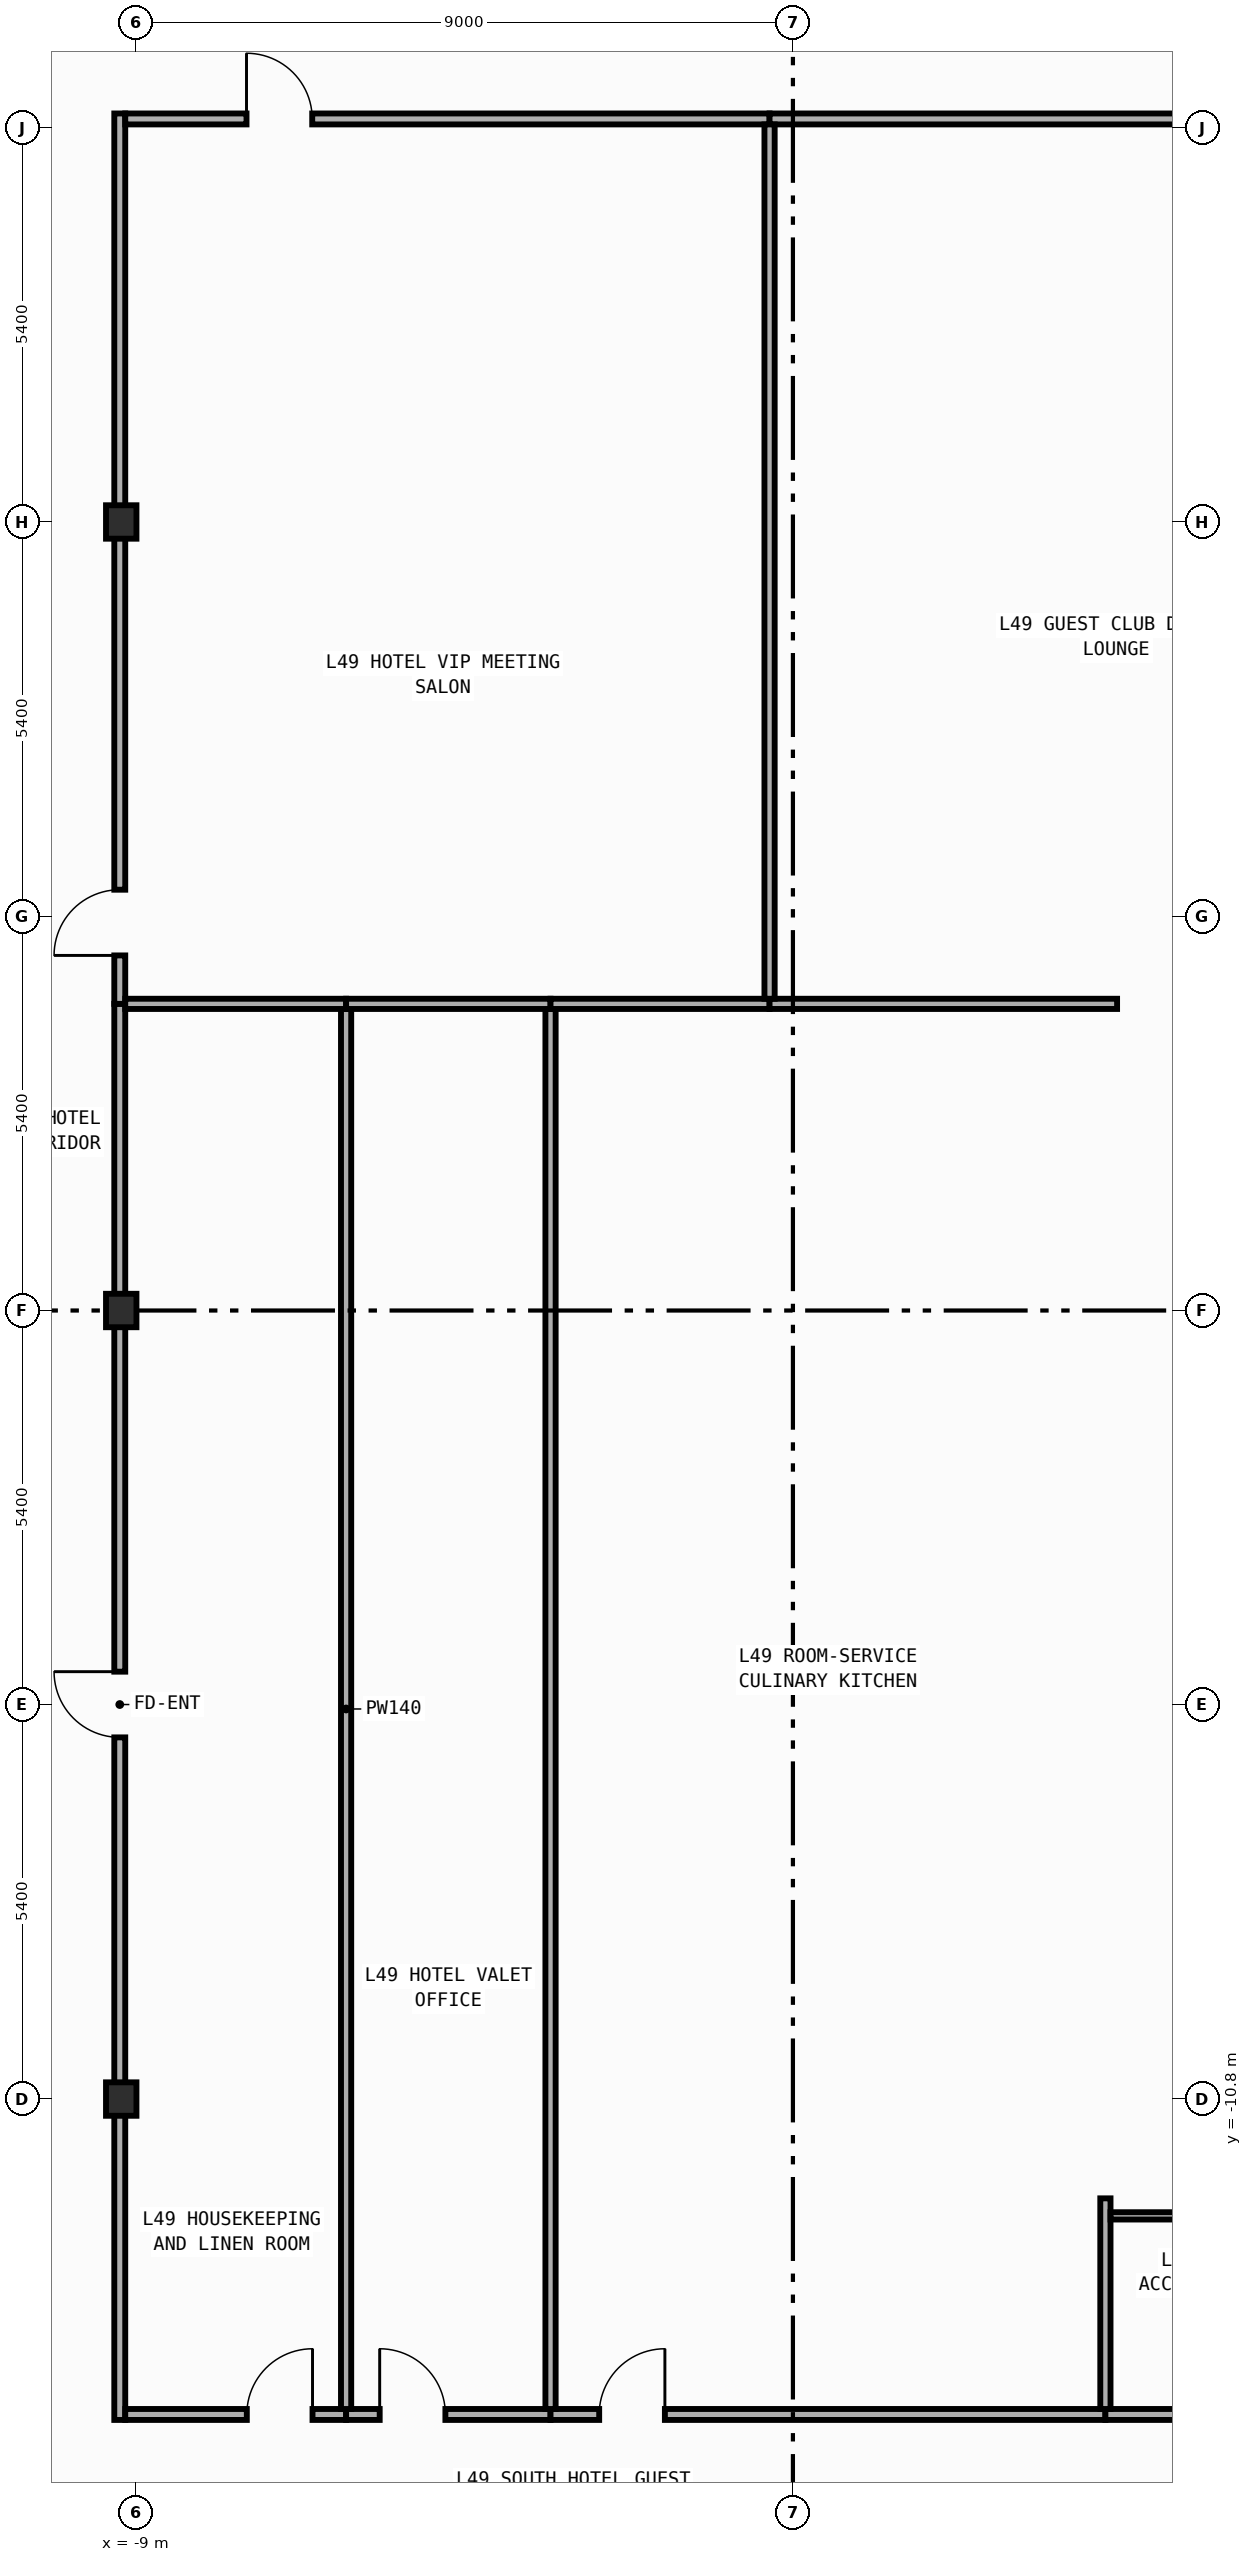
"""IFC4 building model, lengths in metres.
Left out: names, types, materials, properties, quantities, classifications, styles, units other than length and angle.
Written with IfcOpenShell. Run it as: python <this file> out.ifc"""

import sys

from ifc_helpers import new_model, si_unit, direction, frame, frame_2d, origin, origin_2d, place, context, subcontext, project, spatial, rectangle, i_section, extrude, element, fill, save


model = new_model("IFC4")
c1 = context("Model", 3, precision=1e-05, world=origin(), true_north=direction((0.0, 1.0)))
c2 = subcontext(c1, "Body", "Model", "MODEL_VIEW")
j1 = project(units=[si_unit("LENGTHUNIT", "METRE"), si_unit("PLANEANGLEUNIT", "RADIAN")], contexts=[c1])
p1 = place(None, origin())
s1 = spatial("IfcSite", under=j1, at=p1, CompositionType="ELEMENT")
p2 = place(p1, origin())
s2 = spatial("IfcBuilding", under=s1, at=p2, CompositionType="ELEMENT")
p3 = place(p2, frame((0.0, 0.0, 210.6)))
s3 = spatial("IfcBuildingStorey", under=s2, at=p3, CompositionType="ELEMENT", Elevation=210.6)
for number, where, z_axis, x_axis in (
    (1, (-9.2, -10.8, 0.0), (0.0, 0.0, 1.0), (1.0, 0.0, 0.0)),
    (2, (-9.2, 0.0, 0.0), (0.0, 0.0, 1.0), (1.0, 0.0, 0.0)),
    (3, (-9.2, 10.8, 0.0), (0.0, 0.0, 1.0), (1.0, 0.0, 0.0)),
):
    element("IfcColumn", number, at=place(p3, frame(where, z_axis=z_axis, x_axis=x_axis)), inside=s3, PredefinedType="COLUMN", context=c2, shape_type="SweptSolid", body=[
        extrude(i_section(OverallWidth=0.417, OverallDepth=0.458, WebThickness=0.03, FlangeThickness=0.05, FilletRadius=0.022, at=origin_2d()), origin(), (0.0, 0.0, 1.0), 3.8),
    ])
p4 = place(p3, frame((-9.22, -15.195, 0.0), z_axis=(0.0, 0.0, 1.0), x_axis=(0.0, 1.0, 0.0)))
e4 = element("IfcWall", 4, at=p4, inside=s3, PredefinedType="PARTITIONING", context=c2, shape_type="SweptSolid", body=[
    extrude(rectangle(XDim=19.395, YDim=0.15, at=frame_2d((9.698, 0.0))), origin(), (0.0, 0.0, 1.0), 2.862),
])
p5 = place(p4, frame((9.348, 0.0, 0.0)))
e5 = element("IfcOpeningElement", 5, at=p5, cuts=e4, PredefinedType="OPENING", context=c2, shape_type="SweptSolid", body=[
    extrude(rectangle(XDim=0.9, YDim=2.15, at=frame_2d((0.45, 1.075))), frame((0.0, 0.085, 0.0), z_axis=(0.0, -1.0, 0.0), x_axis=(1.0, 0.0, 0.0)), (0.0, 0.0, 1.0), 0.17),
])
p6 = place(p3, frame((-9.22, 4.2, 0.0), z_axis=(0.0, 0.0, 1.0), x_axis=(0.0, 1.0, 0.0)))
e6 = element("IfcWall", 6, at=p6, inside=s3, PredefinedType="PARTITIONING", context=c2, shape_type="SweptSolid", body=[
    extrude(rectangle(XDim=12.195, YDim=0.15, at=frame_2d((6.098, 0.0))), origin(), (0.0, 0.0, 1.0), 2.862),
])
p7 = place(p6, frame((0.663, 0.0, 0.0)))
e7 = element("IfcOpeningElement", 7, at=p7, cuts=e6, PredefinedType="OPENING", context=c2, shape_type="SweptSolid", body=[
    extrude(rectangle(XDim=0.9, YDim=2.15, at=frame_2d((0.45, 1.075))), frame((0.0, 0.085, 0.0), z_axis=(0.0, -1.0, 0.0), x_axis=(1.0, 0.0, 0.0)), (0.0, 0.0, 1.0), 0.17),
])
p8 = place(p3, frame((-9.145, 16.32, 0.0), z_axis=(0.0, 0.0, 1.0), x_axis=(1.0, 0.0, 0.0)))
e8 = element("IfcWall", 8, at=p8, inside=s3, PredefinedType="PARTITIONING", context=c2, shape_type="SweptSolid", body=[
    extrude(rectangle(XDim=8.825, YDim=0.15, at=frame_2d((4.413, 0.0))), origin(), (0.0, 0.0, 1.0), 3.45),
])
p9 = place(p8, frame((1.661, 0.0, 0.0)))
e9 = element("IfcOpeningElement", 9, at=p9, cuts=e8, PredefinedType="OPENING", context=c2, shape_type="SweptSolid", body=[
    extrude(rectangle(XDim=0.9, YDim=2.15, at=frame_2d((0.45, 1.075))), frame((0.0, 0.085, 0.0), z_axis=(0.0, -1.0, 0.0), x_axis=(1.0, 0.0, 0.0)), (0.0, 0.0, 1.0), 0.17),
])
p10 = place(p3, frame((-0.32, 16.32, 0.0), z_axis=(0.0, 0.0, 1.0), x_axis=(1.0, 0.0, 0.0)))
e10 = element("IfcWall", 10, at=p10, inside=s3, PredefinedType="PARTITIONING", context=c2, shape_type="SweptSolid", body=[
    extrude(rectangle(XDim=9.465, YDim=0.15, at=frame_2d((4.732, 0.0))), origin(), (0.0, 0.0, 1.0), 3.45),
])
p11 = place(p10, frame((6.898, 0.0, 0.0)))
e11 = element("IfcOpeningElement", 11, at=p11, cuts=e10, PredefinedType="OPENING", context=c2, shape_type="SweptSolid", body=[
    extrude(rectangle(XDim=0.9, YDim=2.15, at=frame_2d((0.45, 1.075))), frame((0.0, 0.085, 0.0), z_axis=(0.0, -1.0, 0.0), x_axis=(1.0, 0.0, 0.0)), (0.0, 0.0, 1.0), 0.17),
])
p12 = place(p3, frame((-9.145, -15.12, 0.0), z_axis=(0.0, 0.0, 1.0), x_axis=(1.0, 0.0, 0.0)))
e12 = element("IfcWall", 12, at=p12, inside=s3, PredefinedType="PARTITIONING", context=c2, shape_type="SweptSolid", body=[
    extrude(rectangle(XDim=3.025, YDim=0.15, at=frame_2d((1.512, 0.0))), origin(), (0.0, 0.0, 1.0), 3.45),
])
p13 = place(p12, frame((1.665, 0.0, 0.0)))
e13 = element("IfcOpeningElement", 13, at=p13, cuts=e12, PredefinedType="OPENING", context=c2, shape_type="SweptSolid", body=[
    extrude(rectangle(XDim=0.9, YDim=2.15, at=frame_2d((0.45, 1.075))), frame((0.0, 0.085, 0.0), z_axis=(0.0, -1.0, 0.0), x_axis=(1.0, 0.0, 0.0)), (0.0, 0.0, 1.0), 0.17),
])
p14 = place(p3, frame((-6.12, -15.12, 0.0), z_axis=(0.0, 0.0, 1.0), x_axis=(1.0, 0.0, 0.0)))
e14 = element("IfcWall", 14, at=p14, inside=s3, PredefinedType="PARTITIONING", context=c2, shape_type="SweptSolid", body=[
    extrude(rectangle(XDim=2.8, YDim=0.15, at=frame_2d((1.4, 0.0))), origin(), (0.0, 0.0, 1.0), 3.45),
])
p15 = place(p14, frame((0.46, 0.0, 0.0)))
e15 = element("IfcOpeningElement", 15, at=p15, cuts=e14, PredefinedType="OPENING", context=c2, shape_type="SweptSolid", body=[
    extrude(rectangle(XDim=0.9, YDim=2.15, at=frame_2d((0.45, 1.075))), frame((0.0, 0.085, 0.0), z_axis=(0.0, -1.0, 0.0), x_axis=(1.0, 0.0, 0.0)), (0.0, 0.0, 1.0), 0.17),
])
p16 = place(p3, frame((-3.32, -15.12, 0.0), z_axis=(0.0, 0.0, 1.0), x_axis=(1.0, 0.0, 0.0)))
e16 = element("IfcWall", 16, at=p16, inside=s3, PredefinedType="PARTITIONING", context=c2, shape_type="SweptSolid", body=[
    extrude(rectangle(XDim=7.6, YDim=0.15, at=frame_2d((3.8, 0.0))), origin(), (0.0, 0.0, 1.0), 3.45),
])
p17 = place(p16, frame((0.667, 0.0, 0.0)))
e17 = element("IfcOpeningElement", 17, at=p17, cuts=e16, PredefinedType="OPENING", context=c2, shape_type="SweptSolid", body=[
    extrude(rectangle(XDim=0.9, YDim=2.15, at=frame_2d((0.45, 1.075))), frame((0.0, 0.085, 0.0), z_axis=(0.0, -1.0, 0.0), x_axis=(1.0, 0.0, 0.0)), (0.0, 0.0, 1.0), 0.17),
])
p18 = place(p3, frame((4.28, -15.12, 0.0), z_axis=(0.0, 0.0, 1.0), x_axis=(1.0, 0.0, 0.0)))
e18 = element("IfcWall", 18, at=p18, inside=s3, PredefinedType="PARTITIONING", context=c2, shape_type="SweptSolid", body=[
    extrude(rectangle(XDim=2.9, YDim=0.15, at=frame_2d((1.45, 0.0))), origin(), (0.0, 0.0, 1.0), 3.45),
])
p19 = place(p18, frame((1.54, 0.0, 0.0)))
e19 = element("IfcOpeningElement", 19, at=p19, cuts=e18, PredefinedType="OPENING", context=c2, shape_type="SweptSolid", body=[
    extrude(rectangle(XDim=0.9, YDim=2.15, at=frame_2d((0.45, 1.075))), frame((0.0, 0.085, 0.0), z_axis=(0.0, -1.0, 0.0), x_axis=(1.0, 0.0, 0.0)), (0.0, 0.0, 1.0), 0.17),
])
p20 = place(p3, frame((-6.12, -15.045, 0.0), z_axis=(0.0, 0.0, 1.0), x_axis=(0.0, 1.0, 0.0)))
e20 = element("IfcWall", 20, at=p20, inside=s3, PredefinedType="PARTITIONING", context=c2, shape_type="SweptSolid", body=[
    extrude(rectangle(XDim=19.175, YDim=0.14, at=frame_2d((9.587, 0.0))), origin(), (0.0, 0.0, 1.0), 3.45),
])
p21 = place(p3, frame((-9.145, 4.2, 0.0), z_axis=(0.0, 0.0, 1.0), x_axis=(1.0, 0.0, 0.0)))
e21 = element("IfcWall", 21, at=p21, inside=s3, PredefinedType="PARTITIONING", context=c2, shape_type="SweptSolid", body=[
    extrude(rectangle(XDim=3.025, YDim=0.14, at=frame_2d((1.512, 0.0))), origin(), (0.0, 0.0, 1.0), 3.45),
])
p22 = place(p3, frame((-3.32, -15.045, 0.0), z_axis=(0.0, 0.0, 1.0), x_axis=(0.0, 1.0, 0.0)))
e22 = element("IfcWall", 22, at=p22, inside=s3, PredefinedType="PARTITIONING", context=c2, shape_type="SweptSolid", body=[
    extrude(rectangle(XDim=19.175, YDim=0.14, at=frame_2d((9.587, 0.0))), origin(), (0.0, 0.0, 1.0), 3.45),
])
p23 = place(p3, frame((-6.12, 4.2, 0.0), z_axis=(0.0, 0.0, 1.0), x_axis=(1.0, 0.0, 0.0)))
e23 = element("IfcWall", 23, at=p23, inside=s3, PredefinedType="PARTITIONING", context=c2, shape_type="SweptSolid", body=[
    extrude(rectangle(XDim=2.8, YDim=0.14, at=frame_2d((1.4, 0.0))), origin(), (0.0, 0.0, 1.0), 3.45),
])
p24 = place(p3, frame((4.28, -15.045, 0.0), z_axis=(0.0, 0.0, 1.0), x_axis=(0.0, 1.0, 0.0)))
e24 = element("IfcWall", 24, at=p24, inside=s3, PredefinedType="PARTITIONING", context=c2, shape_type="SweptSolid", body=[
    extrude(rectangle(XDim=2.885, YDim=0.14, at=frame_2d((1.442, 0.0))), origin(), (0.0, 0.0, 1.0), 3.45),
])
p25 = place(p3, frame((-3.32, 4.2, 0.0), z_axis=(0.0, 0.0, 1.0), x_axis=(1.0, 0.0, 0.0)))
e25 = element("IfcWall", 25, at=p25, inside=s3, PredefinedType="PARTITIONING", context=c2, shape_type="SweptSolid", body=[
    extrude(rectangle(XDim=3.0, YDim=0.14, at=frame_2d((1.5, 0.0))), origin(), (0.0, 0.0, 1.0), 3.45),
])
p26 = place(p3, frame((-0.32, 4.2, 0.0), z_axis=(0.0, 0.0, 1.0), x_axis=(1.0, 0.0, 0.0)))
e26 = element("IfcWall", 26, at=p26, inside=s3, PredefinedType="PARTITIONING", context=c2, shape_type="SweptSolid", body=[
    extrude(rectangle(XDim=4.76, YDim=0.14, at=frame_2d((2.38, 0.0))), origin(), (0.0, 0.0, 1.0), 3.45),
])
p27 = place(p3, frame((-0.32, 4.27, 0.0), z_axis=(0.0, 0.0, 1.0), x_axis=(0.0, 1.0, 0.0)))
e27 = element("IfcWall", 27, at=p27, inside=s3, PredefinedType="PARTITIONING", context=c2, shape_type="SweptSolid", body=[
    extrude(rectangle(XDim=11.975, YDim=0.14, at=frame_2d((5.988, 0.0))), origin(), (0.0, 0.0, 1.0), 3.45),
])
p28 = place(p3, frame((4.35, -12.4, 0.0), z_axis=(0.0, 0.0, 1.0), x_axis=(1.0, 0.0, 0.0)))
e28 = element("IfcWall", 28, at=p28, inside=s3, PredefinedType="PARTITIONING", context=c2, shape_type="SweptSolid", body=[
    extrude(rectangle(XDim=2.76, YDim=0.1, at=frame_2d((1.38, 0.0))), origin(), (0.0, 0.0, 1.0), 3.45),
])
p29 = place(p5, origin())
e29 = element("IfcDoor", 29, at=p29, inside=s3, OperationType="SINGLE_SWING_RIGHT", PredefinedType="DOOR", context=c2, shape_type="SweptSolid", body=[
    extrude(rectangle(XDim=0.9, YDim=2.15, at=frame_2d((0.45, 1.075))), frame((0.0, 0.025, 0.0), z_axis=(0.0, -1.0, 0.0), x_axis=(1.0, 0.0, 0.0)), (0.0, 0.0, 1.0), 0.05),
])
fill(e5, e29)
p30 = place(p7, origin())
e30 = element("IfcDoor", 30, at=p30, inside=s3, OperationType="SINGLE_SWING_LEFT", PredefinedType="DOOR", context=c2, shape_type="SweptSolid", body=[
    extrude(rectangle(XDim=0.9, YDim=2.15, at=frame_2d((0.45, 1.075))), frame((0.0, 0.025, 0.0), z_axis=(0.0, -1.0, 0.0), x_axis=(1.0, 0.0, 0.0)), (0.0, 0.0, 1.0), 0.05),
])
fill(e7, e30)
p31 = place(p9, origin())
e31 = element("IfcDoor", 31, at=p31, inside=s3, OperationType="SINGLE_SWING_LEFT", PredefinedType="DOOR", context=c2, shape_type="SweptSolid", body=[
    extrude(rectangle(XDim=0.9, YDim=2.15, at=frame_2d((0.45, 1.075))), frame((0.0, 0.025, 0.0), z_axis=(0.0, -1.0, 0.0), x_axis=(1.0, 0.0, 0.0)), (0.0, 0.0, 1.0), 0.05),
])
fill(e9, e31)
p32 = place(p13, origin())
e32 = element("IfcDoor", 32, at=p32, inside=s3, OperationType="SINGLE_SWING_RIGHT", PredefinedType="DOOR", context=c2, shape_type="SweptSolid", body=[
    extrude(rectangle(XDim=0.9, YDim=2.15, at=frame_2d((0.45, 1.075))), frame((0.0, 0.025, 0.0), z_axis=(0.0, -1.0, 0.0), x_axis=(1.0, 0.0, 0.0)), (0.0, 0.0, 1.0), 0.05),
])
fill(e13, e32)
p33 = place(p15, origin())
e33 = element("IfcDoor", 33, at=p33, inside=s3, OperationType="SINGLE_SWING_LEFT", PredefinedType="DOOR", context=c2, shape_type="SweptSolid", body=[
    extrude(rectangle(XDim=0.9, YDim=2.15, at=frame_2d((0.45, 1.075))), frame((0.0, 0.025, 0.0), z_axis=(0.0, -1.0, 0.0), x_axis=(1.0, 0.0, 0.0)), (0.0, 0.0, 1.0), 0.05),
])
fill(e15, e33)
p34 = place(p17, origin())
e34 = element("IfcDoor", 34, at=p34, inside=s3, OperationType="SINGLE_SWING_RIGHT", PredefinedType="DOOR", context=c2, shape_type="SweptSolid", body=[
    extrude(rectangle(XDim=0.9, YDim=2.15, at=frame_2d((0.45, 1.075))), frame((0.0, 0.025, 0.0), z_axis=(0.0, -1.0, 0.0), x_axis=(1.0, 0.0, 0.0)), (0.0, 0.0, 1.0), 0.05),
])
fill(e17, e34)
save(model, sys.argv[1])
